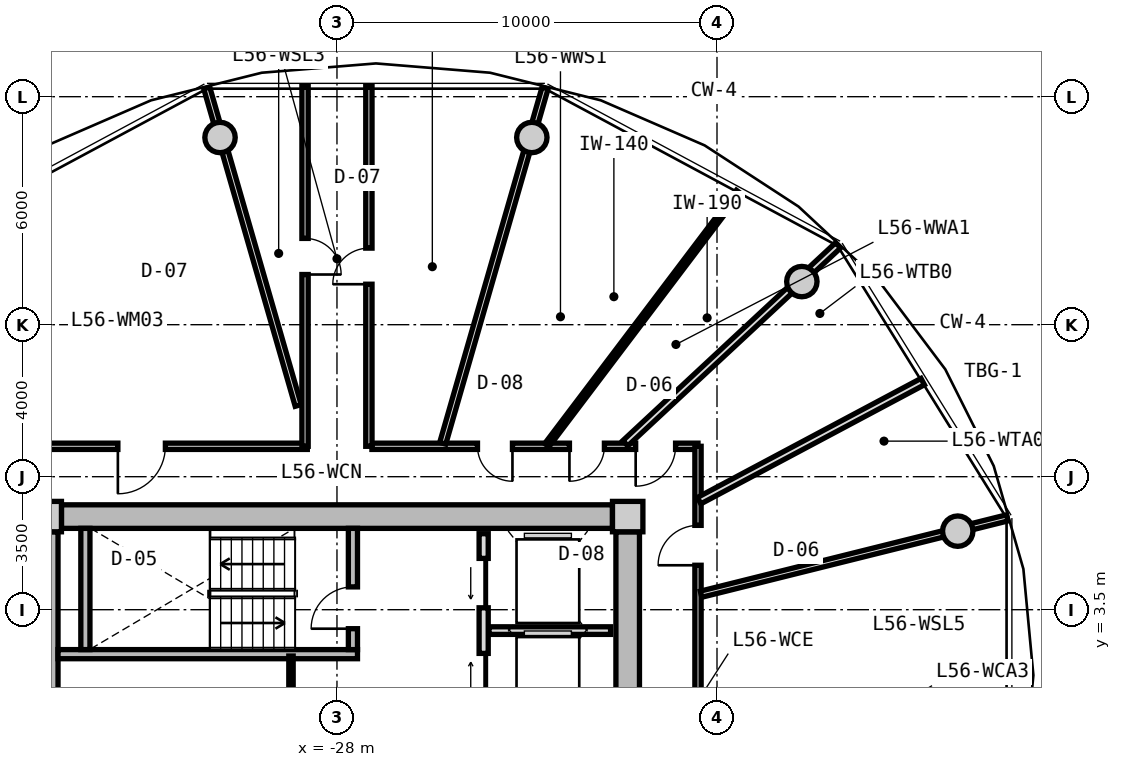
"""IFC4 building model, lengths in metres.
Left out: names, types, materials, properties, quantities, classifications, styles, units other than length and angle.
Written with IfcOpenShell. Run it as: python <this file> out.ifc"""

import sys

from ifc_helpers import new_model, si_unit, direction, frame, frame_2d, origin, origin_2d, place, context, subcontext, project, spatial, rectangle, circle, extrude, source, transform, mapped, element, fill, save


model = new_model("IFC4")
c1 = context("Model", 3, precision=1e-05, world=origin(), true_north=direction((0.0, 1.0)))
c2 = subcontext(c1, "Body", "Model", "MODEL_VIEW")
j1 = project(units=[si_unit("LENGTHUNIT", "METRE"), si_unit("PLANEANGLEUNIT", "RADIAN")], contexts=[c1])
p1 = place(None, origin())
s1 = spatial("IfcSite", under=j1, at=p1, CompositionType="ELEMENT")
p2 = place(p1, origin())
s2 = spatial("IfcBuilding", under=s1, at=p2, CompositionType="ELEMENT")
p3 = place(p2, frame((0.0, 0.0, 180.05)))
s3 = spatial("IfcBuildingStorey", under=s2, at=p3, CompositionType="ELEMENT", Elevation=180.05)
m1 = source(origin(), c2, "Body", "SweptSolid", [
    extrude(rectangle(XDim=0.8, YDim=0.8, at=origin_2d()), origin(), (0.0, 0.0, 1.0), 3.05),
])
for number, where, z_axis, x_axis in (
    (1, (-20.35, 5.95, 0.0), (0.0, 0.0, 1.0), (1.0, 0.0, 0.0)),
    (2, (-35.65, 5.95, 0.0), (0.0, 0.0, 1.0), (1.0, 0.0, 0.0)),
):
    element("IfcColumn", number, at=place(p3, frame(where, z_axis=z_axis, x_axis=x_axis)), inside=s3, PredefinedType="COLUMN", context=c2, shape_type="MappedRepresentation", body=[
        mapped(m1, transform((0.0, 0.0, 0.0), x_axis=(1.0, 0.0, 0.0), y_axis=(0.0, 1.0, 0.0), z_axis=(0.0, 0.0, 1.0), scale=1.0)),
    ])
m2 = source(origin(), c2, "Body", "SweptSolid", [
    extrude(rectangle(XDim=14.5, YDim=0.62, at=frame_2d((7.25, 0.0))), origin(), (0.0, 0.0, 1.0), 2.81),
])
p4 = place(p3, frame((-35.25, 5.95, 0.0), z_axis=(0.0, 0.0, 1.0), x_axis=(1.0, 0.0, 0.0)))
e3 = element("IfcWall", 3, at=p4, inside=s3, PredefinedType="SHEAR", context=c2, shape_type="MappedRepresentation", body=[
    mapped(m2, transform((0.0, 0.0, 0.0), x_axis=(1.0, 0.0, 0.0), y_axis=(0.0, 1.0, 0.0), z_axis=(0.0, 0.0, 1.0), scale=1.0)),
])
m3 = source(origin(), c2, "Body", "SweptSolid", [
    extrude(rectangle(XDim=11.1, YDim=0.62, at=frame_2d((5.55, 0.0))), origin(), (0.0, 0.0, 1.0), 2.81),
])
p5 = place(p3, frame((-35.65, -5.55, 0.0), z_axis=(0.0, 0.0, 1.0), x_axis=(0.0, 1.0, 0.0)))
e4 = element("IfcWall", 4, at=p5, inside=s3, PredefinedType="SHEAR", context=c2, shape_type="MappedRepresentation", body=[
    mapped(m3, transform((0.0, 0.0, 0.0), x_axis=(1.0, 0.0, 0.0), y_axis=(0.0, 1.0, 0.0), z_axis=(0.0, 0.0, 1.0), scale=1.0)),
])
p6 = place(p5, frame((3.8, 0.0, 0.0)))
e5 = element("IfcOpeningElement", 5, at=p6, cuts=e4, PredefinedType="OPENING", context=c2, shape_type="SweptSolid", body=[
    extrude(rectangle(XDim=1.2, YDim=2.15, at=frame_2d((0.6, 1.075))), frame((0.0, 0.32, 0.0), z_axis=(0.0, -1.0, 0.0), x_axis=(1.0, 0.0, 0.0)), (0.0, 0.0, 1.0), 0.64),
])
p7 = place(p3, frame((-20.35, 5.55, 0.0), z_axis=(0.0, 0.0, 1.0), x_axis=(0.0, -1.0, 0.0)))
e6 = element("IfcWall", 6, at=p7, inside=s3, PredefinedType="SHEAR", context=c2, shape_type="MappedRepresentation", body=[
    mapped(m3, transform((0.0, 0.0, 0.0), x_axis=(1.0, 0.0, 0.0), y_axis=(0.0, 1.0, 0.0), z_axis=(0.0, 0.0, 1.0), scale=1.0)),
])
p8 = place(p7, frame((5.65, 0.0, 0.0)))
e7 = element("IfcOpeningElement", 7, at=p8, cuts=e6, PredefinedType="OPENING", context=c2, shape_type="SweptSolid", body=[
    extrude(rectangle(XDim=1.2, YDim=2.15, at=frame_2d((0.6, 1.075))), frame((0.0, 0.32, 0.0), z_axis=(0.0, -1.0, 0.0), x_axis=(1.0, 0.0, 0.0)), (0.0, 0.0, 1.0), 0.64),
])
m4 = source(origin(), c2, "Body", "SweptSolid", [
    extrude(circle(Radius=0.4, at=origin_2d()), origin(), (0.0, 0.0, 1.0), 3.05),
])
for number, where, z_axis, x_axis in (
    (8, (-11.665, 5.567, 0.0), (0.0, 0.0, 1.0), (1.0, 0.0, 0.0)),
    (9, (-15.767, 12.135, 0.0), (0.0, 0.0, 1.0), (1.0, 0.0, 0.0)),
    (10, (-22.873, 15.926, 0.0), (0.0, 0.0, 1.0), (1.0, 0.0, 0.0)),
    (11, (-31.077, 15.926, 0.0), (0.0, 0.0, 1.0), (1.0, 0.0, 0.0)),
):
    element("IfcColumn", number, at=place(p3, frame(where, z_axis=z_axis, x_axis=x_axis)), inside=s3, PredefinedType="COLUMN", context=c2, shape_type="MappedRepresentation", body=[
        mapped(m4, transform((0.0, 0.0, 0.0), x_axis=(1.0, 0.0, 0.0), y_axis=(0.0, 1.0, 0.0), z_axis=(0.0, 0.0, 1.0), scale=1.0)),
    ])
m5 = source(origin(), c2, "Body", "SweptSolid", [
    extrude(rectangle(XDim=7.88, YDim=0.24, at=frame_2d((3.94, 0.0))), origin(), (0.0, 0.0, 1.0), 2.81),
])
p9 = place(p3, frame((-35.34, 2.33, 0.0), z_axis=(0.0, 0.0, 1.0), x_axis=(1.0, 0.0, 0.0)))
e12 = element("IfcWall", 12, at=p9, inside=s3, PredefinedType="PARTITIONING", context=c2, shape_type="MappedRepresentation", body=[
    mapped(m5, transform((0.0, 0.0, 0.0), x_axis=(1.0, 0.0, 0.0), y_axis=(0.0, 1.0, 0.0), z_axis=(0.0, 0.0, 1.0), scale=1.0)),
])
m6 = source(origin(), c2, "Body", "SweptSolid", [
    extrude(rectangle(XDim=3.19, YDim=0.24, at=frame_2d((1.595, 0.0))), origin(), (0.0, 0.0, 1.0), 2.81),
])
p10 = place(p3, frame((-34.62, 2.45, 0.0), z_axis=(0.0, 0.0, 1.0), x_axis=(0.0, 1.0, 0.0)))
e13 = element("IfcWall", 13, at=p10, inside=s3, PredefinedType="PARTITIONING", context=c2, shape_type="MappedRepresentation", body=[
    mapped(m6, transform((0.0, 0.0, 0.0), x_axis=(1.0, 0.0, 0.0), y_axis=(0.0, 1.0, 0.0), z_axis=(0.0, 0.0, 1.0), scale=1.0)),
])
p11 = place(p3, frame((-27.58, 2.45, 0.0), z_axis=(0.0, 0.0, 1.0), x_axis=(0.0, 1.0, 0.0)))
e14 = element("IfcWall", 14, at=p11, inside=s3, PredefinedType="PARTITIONING", context=c2, shape_type="MappedRepresentation", body=[
    mapped(m6, transform((0.0, 0.0, 0.0), x_axis=(1.0, 0.0, 0.0), y_axis=(0.0, 1.0, 0.0), z_axis=(0.0, 0.0, 1.0), scale=1.0)),
])
p12 = place(p11, frame((0.55, 0.0, 0.0)))
e15 = element("IfcOpeningElement", 15, at=p12, cuts=e14, PredefinedType="OPENING", context=c2, shape_type="SweptSolid", body=[
    extrude(rectangle(XDim=1.1, YDim=2.15, at=frame_2d((0.55, 1.075))), frame((0.0, 0.13, 0.0), z_axis=(0.0, -1.0, 0.0), x_axis=(1.0, 0.0, 0.0)), (0.0, 0.0, 1.0), 0.26),
])
m7 = source(origin(), c2, "Body", "SweptSolid", [
    extrude(rectangle(XDim=5.0, YDim=0.24, at=frame_2d((2.5, 0.0))), origin(), (0.0, 0.0, 1.0), 2.795),
])
p13 = place(p3, frame((-24.14, 0.5, 0.0), z_axis=(0.0, 0.0, 1.0), x_axis=(0.0, 1.0, 0.0)))
e16 = element("IfcWall", 16, at=p13, inside=s3, PredefinedType="PARTITIONING", context=c2, shape_type="MappedRepresentation", body=[
    mapped(m7, transform((0.0, 0.0, 0.0), x_axis=(1.0, 0.0, 0.0), y_axis=(0.0, 1.0, 0.0), z_axis=(0.0, 0.0, 1.0), scale=1.0)),
])
p14 = place(p13, frame((3.05, 0.0, 0.0)))
e17 = element("IfcOpeningElement", 17, at=p14, cuts=e16, PredefinedType="OPENING", context=c2, shape_type="SweptSolid", body=[
    extrude(rectangle(XDim=1.3, YDim=2.2, at=frame_2d((0.65, 1.1))), frame((0.0, 0.13, 0.0), z_axis=(0.0, -1.0, 0.0), x_axis=(1.0, 0.0, 0.0)), (0.0, 0.0, 1.0), 0.26),
])
p15 = place(p13, frame((0.55, 0.0, 0.0)))
e18 = element("IfcOpeningElement", 18, at=p15, cuts=e16, PredefinedType="OPENING", context=c2, shape_type="SweptSolid", body=[
    extrude(rectangle(XDim=1.3, YDim=2.2, at=frame_2d((0.65, 1.1))), frame((0.0, 0.13, 0.0), z_axis=(0.0, -1.0, 0.0), x_axis=(1.0, 0.0, 0.0)), (0.0, 0.0, 1.0), 0.26),
])
m8 = source(origin(), c2, "Body", "SweptSolid", [
    extrude(rectangle(XDim=3.2, YDim=0.2, at=frame_2d((1.6, 0.0))), origin(), (0.0, 0.0, 1.0), 2.795),
])
p16 = place(p3, frame((-24.0, 2.95, 0.0), z_axis=(0.0, 0.0, 1.0), x_axis=(1.0, 0.0, 0.0)))
e19 = element("IfcWall", 19, at=p16, inside=s3, PredefinedType="PARTITIONING", context=c2, shape_type="MappedRepresentation", body=[
    mapped(m8, transform((0.0, 0.0, 0.0), x_axis=(1.0, 0.0, 0.0), y_axis=(0.0, 1.0, 0.0), z_axis=(0.0, 0.0, 1.0), scale=1.0)),
])
m9 = source(origin(), c2, "Body", "SweptSolid", [
    extrude(rectangle(XDim=2.33, YDim=0.115, at=frame_2d((1.165, 0.0))), origin(), (0.0, 0.0, 1.0), 2.795),
])
p17 = place(p3, frame((-29.21, -0.05, 0.0), z_axis=(0.0, 0.0, 1.0), x_axis=(0.0, 1.0, 0.0)))
e20 = element("IfcWall", 20, at=p17, inside=s3, PredefinedType="PARTITIONING", context=c2, shape_type="MappedRepresentation", body=[
    mapped(m9, transform((0.0, 0.0, 0.0), x_axis=(1.0, 0.0, 0.0), y_axis=(0.0, 1.0, 0.0), z_axis=(0.0, 0.0, 1.0), scale=1.0)),
])
m10 = source(origin(), c2, "Body", "SweptSolid", [
    extrude(rectangle(XDim=8.719, YDim=0.165, at=frame_2d((4.36, 0.0))), origin(), (0.0, 0.0, 1.0), 2.795),
])
p18 = place(p3, frame((-37.5, 7.8, 0.0), z_axis=(0.0, 0.0, 1.0), x_axis=(1.0, 0.0, 0.0)))
e21 = element("IfcWall", 21, at=p18, inside=s3, PredefinedType="PARTITIONING", context=c2, shape_type="MappedRepresentation", body=[
    mapped(m10, transform((0.0, 0.0, 0.0), x_axis=(1.0, 0.0, 0.0), y_axis=(0.0, 1.0, 0.0), z_axis=(0.0, 0.0, 1.0), scale=1.0)),
])
p19 = place(p18, frame((3.735, 0.0, 0.0)))
e22 = element("IfcOpeningElement", 22, at=p19, cuts=e21, PredefinedType="OPENING", context=c2, shape_type="SweptSolid", body=[
    extrude(rectangle(XDim=1.25, YDim=2.2, at=frame_2d((0.625, 1.1))), frame((0.0, 0.093, 0.0), z_axis=(0.0, -1.0, 0.0), x_axis=(1.0, 0.0, 0.0)), (0.0, 0.0, 1.0), 0.185),
])
m11 = source(origin(), c2, "Body", "SweptSolid", [
    extrude(rectangle(XDim=8.58, YDim=0.165, at=frame_2d((4.29, 0.0))), origin(), (0.0, 0.0, 1.0), 2.795),
])
p20 = place(p3, frame((-27.08, 7.8, 0.0), z_axis=(0.0, 0.0, 1.0), x_axis=(1.0, 0.0, 0.0)))
e23 = element("IfcWall", 23, at=p20, inside=s3, PredefinedType="PARTITIONING", context=c2, shape_type="MappedRepresentation", body=[
    mapped(m11, transform((0.0, 0.0, 0.0), x_axis=(1.0, 0.0, 0.0), y_axis=(0.0, 1.0, 0.0), z_axis=(0.0, 0.0, 1.0), scale=1.0)),
])
p21 = place(p20, frame((6.94, 0.0, 0.0)))
e24 = element("IfcOpeningElement", 24, at=p21, cuts=e23, PredefinedType="OPENING", context=c2, shape_type="SweptSolid", body=[
    extrude(rectangle(XDim=1.05, YDim=2.15, at=frame_2d((0.525, 1.075))), frame((0.0, 0.093, 0.0), z_axis=(0.0, -1.0, 0.0), x_axis=(1.0, 0.0, 0.0)), (0.0, 0.0, 1.0), 0.185),
])
p22 = place(p20, frame((5.197, 0.0, 0.0)))
e25 = element("IfcOpeningElement", 25, at=p22, cuts=e23, PredefinedType="OPENING", context=c2, shape_type="SweptSolid", body=[
    extrude(rectangle(XDim=0.92, YDim=2.1, at=frame_2d((0.46, 1.05))), frame((0.0, 0.093, 0.0), z_axis=(0.0, -1.0, 0.0), x_axis=(1.0, 0.0, 0.0)), (0.0, 0.0, 1.0), 0.185),
])
p23 = place(p20, frame((2.778, 0.0, 0.0)))
e26 = element("IfcOpeningElement", 26, at=p23, cuts=e23, PredefinedType="OPENING", context=c2, shape_type="SweptSolid", body=[
    extrude(rectangle(XDim=0.92, YDim=2.1, at=frame_2d((0.46, 1.05))), frame((0.0, 0.093, 0.0), z_axis=(0.0, -1.0, 0.0), x_axis=(1.0, 0.0, 0.0)), (0.0, 0.0, 1.0), 0.185),
])
m12 = source(origin(), c2, "Body", "SweptSolid", [
    extrude(rectangle(XDim=6.88, YDim=0.165, at=frame_2d((3.44, 0.0))), origin(), (0.0, 0.0, 1.0), 2.795),
])
p24 = place(p3, frame((-18.5, 7.8, 0.0), z_axis=(0.0, 0.0, 1.0), x_axis=(0.0, -1.0, 0.0)))
e27 = element("IfcWall", 27, at=p24, inside=s3, PredefinedType="PARTITIONING", context=c2, shape_type="MappedRepresentation", body=[
    mapped(m12, transform((0.0, 0.0, 0.0), x_axis=(1.0, 0.0, 0.0), y_axis=(0.0, 1.0, 0.0), z_axis=(0.0, 0.0, 1.0), scale=1.0)),
])
p25 = place(p24, frame((2.081, 0.0, 0.0)))
e28 = element("IfcOpeningElement", 28, at=p25, cuts=e27, PredefinedType="OPENING", context=c2, shape_type="SweptSolid", body=[
    extrude(rectangle(XDim=1.05, YDim=2.15, at=frame_2d((0.525, 1.075))), frame((0.0, 0.093, 0.0), z_axis=(0.0, -1.0, 0.0), x_axis=(1.0, 0.0, 0.0)), (0.0, 0.0, 1.0), 0.185),
])
m13 = source(origin(), c2, "Body", "SweptSolid", [
    extrude(rectangle(XDim=9.73, YDim=0.165, at=frame_2d((4.865, 0.0))), origin(), (0.0, 0.0, 1.0), 2.345),
])
p26 = place(p3, frame((-25.217, 7.88, 0.0), z_axis=(0.0, 0.0, 1.0), x_axis=(0.27679492614, 0.960929013436, 0.0)))
e29 = element("IfcWall", 29, at=p26, inside=s3, PredefinedType="PARTITIONING", context=c2, shape_type="MappedRepresentation", body=[
    mapped(m13, transform((0.0, 0.0, 0.0), x_axis=(1.0, 0.0, 0.0), y_axis=(0.0, 1.0, 0.0), z_axis=(0.0, 0.0, 1.0), scale=1.0)),
])
m14 = source(origin(), c2, "Body", "SweptSolid", [
    extrude(rectangle(XDim=8.695, YDim=0.165, at=frame_2d((4.348, 0.0))), origin(), (0.0, 0.0, 1.0), 2.345),
])
p27 = place(p3, frame((-29.02, 8.875, 0.0), z_axis=(0.0, 0.0, 1.0), x_axis=(-0.276797231892, 0.960928349263, 0.0)))
e30 = element("IfcWall", 30, at=p27, inside=s3, PredefinedType="PARTITIONING", context=c2, shape_type="MappedRepresentation", body=[
    mapped(m14, transform((0.0, 0.0, 0.0), x_axis=(1.0, 0.0, 0.0), y_axis=(0.0, 1.0, 0.0), z_axis=(0.0, 0.0, 1.0), scale=1.0)),
])
m15 = source(origin(), c2, "Body", "SweptSolid", [
    extrude(rectangle(XDim=8.305, YDim=0.165, at=frame_2d((4.153, 0.0))), origin(), (0.0, 0.0, 1.0), 2.345),
])
p28 = place(p3, frame((-18.42, 3.908, 0.0), z_axis=(0.0, 0.0, 1.0), x_axis=(0.970309994378, 0.241864662175, 0.0)))
e31 = element("IfcWall", 31, at=p28, inside=s3, PredefinedType="PARTITIONING", context=c2, shape_type="MappedRepresentation", body=[
    mapped(m15, transform((0.0, 0.0, 0.0), x_axis=(1.0, 0.0, 0.0), y_axis=(0.0, 1.0, 0.0), z_axis=(0.0, 0.0, 1.0), scale=1.0)),
])
m16 = source(origin(), c2, "Body", "SweptSolid", [
    extrude(rectangle(XDim=9.48, YDim=0.165, at=frame_2d((4.74, 0.0))), origin(), (0.0, 0.0, 1.0), 2.795),
])
p29 = place(p3, frame((-28.84, 7.8, 0.0), z_axis=(0.0, 0.0, 1.0), x_axis=(0.0, 1.0, 0.0)))
e32 = element("IfcWall", 32, at=p29, inside=s3, PredefinedType="PARTITIONING", context=c2, shape_type="MappedRepresentation", body=[
    mapped(m16, transform((0.0, 0.0, 0.0), x_axis=(1.0, 0.0, 0.0), y_axis=(0.0, 1.0, 0.0), z_axis=(0.0, 0.0, 1.0), scale=1.0)),
])
p30 = place(p29, frame((4.521, 0.0, 0.0)))
e33 = element("IfcOpeningElement", 33, at=p30, cuts=e32, PredefinedType="OPENING", context=c2, shape_type="SweptSolid", body=[
    extrude(rectangle(XDim=0.95, YDim=2.1, at=frame_2d((0.475, 1.05))), frame((0.0, 0.093, 0.0), z_axis=(0.0, -1.0, 0.0), x_axis=(1.0, 0.0, 0.0)), (0.0, 0.0, 1.0), 0.185),
])
p31 = place(p3, frame((-27.16, 17.28, 0.0), z_axis=(0.0, 0.0, 1.0), x_axis=(0.0, -1.0, 0.0)))
e34 = element("IfcWall", 34, at=p31, inside=s3, PredefinedType="PARTITIONING", context=c2, shape_type="MappedRepresentation", body=[
    mapped(m16, transform((0.0, 0.0, 0.0), x_axis=(1.0, 0.0, 0.0), y_axis=(0.0, 1.0, 0.0), z_axis=(0.0, 0.0, 1.0), scale=1.0)),
])
p32 = place(p31, frame((4.265, 0.0, 0.0)))
e35 = element("IfcOpeningElement", 35, at=p32, cuts=e34, PredefinedType="OPENING", context=c2, shape_type="SweptSolid", body=[
    extrude(rectangle(XDim=0.95, YDim=2.1, at=frame_2d((0.475, 1.05))), frame((0.0, 0.093, 0.0), z_axis=(0.0, -1.0, 0.0), x_axis=(1.0, 0.0, 0.0)), (0.0, 0.0, 1.0), 0.185),
])
m17 = source(origin(), c2, "Body", "SweptSolid", [
    extrude(rectangle(XDim=7.648, YDim=0.19, at=frame_2d((3.824, 0.0))), origin(), (0.0, 0.0, 1.0), 2.345),
])
p33 = place(p3, frame((-20.413, 7.88, 0.0), z_axis=(0.0, 0.0, 1.0), x_axis=(0.732182665826, 0.681108320213, 0.0)))
e36 = element("IfcWall", 36, at=p33, inside=s3, PredefinedType="PARTITIONING", context=c2, shape_type="MappedRepresentation", body=[
    mapped(m17, transform((0.0, 0.0, 0.0), x_axis=(1.0, 0.0, 0.0), y_axis=(0.0, 1.0, 0.0), z_axis=(0.0, 0.0, 1.0), scale=1.0)),
])
m18 = source(origin(), c2, "Body", "SweptSolid", [
    extrude(rectangle(XDim=6.665, YDim=0.19, at=frame_2d((3.333, 0.0))), origin(), (0.0, 0.0, 1.0), 2.795),
])
p34 = place(p3, frame((-18.47, 6.37, 0.0), z_axis=(0.0, 0.0, 1.0), x_axis=(0.88263769619, 0.470053930166, 0.0)))
e37 = element("IfcWall", 37, at=p34, inside=s3, PredefinedType="PARTITIONING", context=c2, shape_type="MappedRepresentation", body=[
    mapped(m18, transform((0.0, 0.0, 0.0), x_axis=(1.0, 0.0, 0.0), y_axis=(0.0, 1.0, 0.0), z_axis=(0.0, 0.0, 1.0), scale=1.0)),
])
m19 = source(origin(), c2, "Body", "SweptSolid", [
    extrude(rectangle(XDim=8.359, YDim=0.14, at=frame_2d((4.18, 0.0))), origin(), (0.0, 0.0, 1.0), 2.795),
])
p35 = place(p3, frame((-22.477, 7.83, 0.0), z_axis=(0.0, 0.0, 1.0), x_axis=(0.603265985309, 0.797540062297, 0.0)))
e38 = element("IfcWall", 38, at=p35, inside=s3, PredefinedType="PARTITIONING", context=c2, shape_type="MappedRepresentation", body=[
    mapped(m19, transform((0.0, 0.0, 0.0), x_axis=(1.0, 0.0, 0.0), y_axis=(0.0, 1.0, 0.0), z_axis=(0.0, 0.0, 1.0), scale=1.0)),
])
m20 = source(origin(), c2, "Body", "SweptSolid", [
    extrude(rectangle(XDim=1.1, YDim=2.15, at=frame_2d((0.55, 1.075))), frame((0.0, 0.025, 0.0), z_axis=(0.0, -1.0, 0.0), x_axis=(1.0, 0.0, 0.0)), (0.0, 0.0, 1.0), 0.05),
])
p36 = place(p12, origin())
e39 = element("IfcDoor", 39, at=p36, inside=s3, OperationType="SINGLE_SWING_LEFT", PredefinedType="DOOR", context=c2, shape_type="MappedRepresentation", body=[
    mapped(m20, transform((0.0, 0.0, 0.0), x_axis=(1.0, 0.0, 0.0), y_axis=(0.0, 1.0, 0.0), z_axis=(0.0, 0.0, 1.0), scale=1.0)),
])
fill(e15, e39)
m21 = source(origin(), c2, "Body", "SweptSolid", [
    extrude(rectangle(XDim=1.3, YDim=2.2, at=frame_2d((0.65, 1.1))), frame((0.0, 0.025, 0.0), z_axis=(0.0, -1.0, 0.0), x_axis=(1.0, 0.0, 0.0)), (0.0, 0.0, 1.0), 0.05),
])
p37 = place(p14, origin())
e40 = element("IfcDoor", 40, at=p37, inside=s3, OperationType="SLIDING_TO_LEFT", PredefinedType="DOOR", context=c2, shape_type="MappedRepresentation", body=[
    mapped(m21, transform((0.0, 0.0, 0.0), x_axis=(1.0, 0.0, 0.0), y_axis=(0.0, 1.0, 0.0), z_axis=(0.0, 0.0, 1.0), scale=1.0)),
])
fill(e17, e40)
p38 = place(p15, origin())
e41 = element("IfcDoor", 41, at=p38, inside=s3, OperationType="SLIDING_TO_RIGHT", PredefinedType="DOOR", context=c2, shape_type="MappedRepresentation", body=[
    mapped(m21, transform((0.0, 0.0, 0.0), x_axis=(1.0, 0.0, 0.0), y_axis=(0.0, 1.0, 0.0), z_axis=(0.0, 0.0, 1.0), scale=1.0)),
])
fill(e18, e41)
m22 = source(origin(), c2, "Body", "SweptSolid", [
    extrude(rectangle(XDim=0.95, YDim=2.1, at=frame_2d((0.475, 1.05))), frame((0.0, 0.025, 0.0), z_axis=(0.0, -1.0, 0.0), x_axis=(1.0, 0.0, 0.0)), (0.0, 0.0, 1.0), 0.05),
])
p39 = place(p30, frame((0.95, 0.0, 0.0), z_axis=(0.0, 0.0, 1.0), x_axis=(-1.0, 0.0, 0.0)))
e42 = element("IfcDoor", 42, at=p39, inside=s3, OperationType="SINGLE_SWING_RIGHT", PredefinedType="DOOR", context=c2, shape_type="MappedRepresentation", body=[
    mapped(m22, transform((0.0, 0.0, 0.0), x_axis=(1.0, 0.0, 0.0), y_axis=(0.0, 1.0, 0.0), z_axis=(0.0, 0.0, 1.0), scale=1.0)),
])
fill(e33, e42)
p40 = place(p32, frame((0.95, 0.0, 0.0), z_axis=(0.0, 0.0, 1.0), x_axis=(-1.0, 0.0, 0.0)))
e43 = element("IfcDoor", 43, at=p40, inside=s3, OperationType="SINGLE_SWING_LEFT", PredefinedType="DOOR", context=c2, shape_type="MappedRepresentation", body=[
    mapped(m22, transform((0.0, 0.0, 0.0), x_axis=(1.0, 0.0, 0.0), y_axis=(0.0, 1.0, 0.0), z_axis=(0.0, 0.0, 1.0), scale=1.0)),
])
fill(e35, e43)
m23 = source(origin(), c2, "Body", "SweptSolid", [
    extrude(rectangle(XDim=1.05, YDim=2.15, at=frame_2d((0.525, 1.075))), frame((0.0, 0.025, 0.0), z_axis=(0.0, -1.0, 0.0), x_axis=(1.0, 0.0, 0.0)), (0.0, 0.0, 1.0), 0.05),
])
p41 = place(p25, frame((1.05, 0.0, 0.0), z_axis=(0.0, 0.0, 1.0), x_axis=(-1.0, 0.0, 0.0)))
e44 = element("IfcDoor", 44, at=p41, inside=s3, OperationType="SINGLE_SWING_LEFT", PredefinedType="DOOR", context=c2, shape_type="MappedRepresentation", body=[
    mapped(m23, transform((0.0, 0.0, 0.0), x_axis=(1.0, 0.0, 0.0), y_axis=(0.0, 1.0, 0.0), z_axis=(0.0, 0.0, 1.0), scale=1.0)),
])
fill(e28, e44)
p42 = place(p21, frame((1.05, 0.0, 0.0), z_axis=(0.0, 0.0, 1.0), x_axis=(-1.0, 0.0, 0.0)))
e45 = element("IfcDoor", 45, at=p42, inside=s3, OperationType="SINGLE_SWING_RIGHT", PredefinedType="DOOR", context=c2, shape_type="MappedRepresentation", body=[
    mapped(m23, transform((0.0, 0.0, 0.0), x_axis=(1.0, 0.0, 0.0), y_axis=(0.0, 1.0, 0.0), z_axis=(0.0, 0.0, 1.0), scale=1.0)),
])
fill(e24, e45)
m24 = source(origin(), c2, "Body", "SweptSolid", [
    extrude(rectangle(XDim=0.92, YDim=2.1, at=frame_2d((0.46, 1.05))), frame((0.0, 0.025, 0.0), z_axis=(0.0, -1.0, 0.0), x_axis=(1.0, 0.0, 0.0)), (0.0, 0.0, 1.0), 0.05),
])
p43 = place(p22, frame((0.92, 0.0, 0.0), z_axis=(0.0, 0.0, 1.0), x_axis=(-1.0, 0.0, 0.0)))
e46 = element("IfcDoor", 46, at=p43, inside=s3, OperationType="SINGLE_SWING_RIGHT", PredefinedType="DOOR", context=c2, shape_type="MappedRepresentation", body=[
    mapped(m24, transform((0.0, 0.0, 0.0), x_axis=(1.0, 0.0, 0.0), y_axis=(0.0, 1.0, 0.0), z_axis=(0.0, 0.0, 1.0), scale=1.0)),
])
fill(e25, e46)
p44 = place(p23, frame((0.92, 0.0, 0.0), z_axis=(0.0, 0.0, 1.0), x_axis=(-1.0, 0.0, 0.0)))
e47 = element("IfcDoor", 47, at=p44, inside=s3, OperationType="SINGLE_SWING_LEFT", PredefinedType="DOOR", context=c2, shape_type="MappedRepresentation", body=[
    mapped(m24, transform((0.0, 0.0, 0.0), x_axis=(1.0, 0.0, 0.0), y_axis=(0.0, 1.0, 0.0), z_axis=(0.0, 0.0, 1.0), scale=1.0)),
])
fill(e26, e47)
m25 = source(origin(), c2, "Body", "SweptSolid", [
    extrude(rectangle(XDim=1.25, YDim=2.2, at=frame_2d((0.625, 1.1))), frame((0.0, 0.025, 0.0), z_axis=(0.0, -1.0, 0.0), x_axis=(1.0, 0.0, 0.0)), (0.0, 0.0, 1.0), 0.05),
])
p45 = place(p19, frame((1.25, 0.0, 0.0), z_axis=(0.0, 0.0, 1.0), x_axis=(-1.0, 0.0, 0.0)))
e48 = element("IfcDoor", 48, at=p45, inside=s3, OperationType="SINGLE_SWING_RIGHT", PredefinedType="DOOR", context=c2, shape_type="MappedRepresentation", body=[
    mapped(m25, transform((0.0, 0.0, 0.0), x_axis=(1.0, 0.0, 0.0), y_axis=(0.0, 1.0, 0.0), z_axis=(0.0, 0.0, 1.0), scale=1.0)),
])
fill(e22, e48)
save(model, sys.argv[1])
